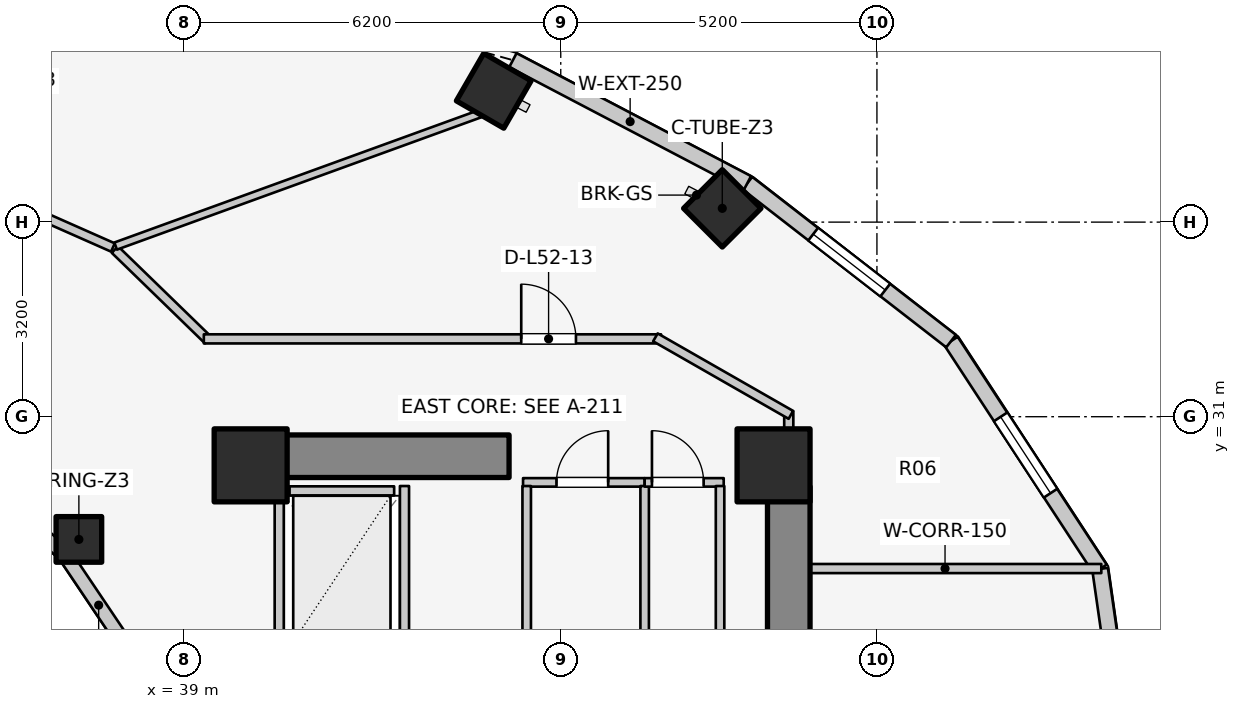
"""IFC4 building model, lengths in metres.
Left out: names, types, materials, properties, quantities, classifications, styles, units other than length and angle.
Written with IfcOpenShell. Run it as: python <this file> out.ifc"""

import sys

from ifc_helpers import new_model, si_unit, direction, frame, frame_2d, origin, origin_2d, place, context, subcontext, project, spatial, rectangle, extrude, element, fill, save


model = new_model("IFC4")
c1 = context("Model", 3, precision=1e-05, world=origin(), true_north=direction((0.0, 1.0)))
c2 = subcontext(c1, "Body", "Model", "MODEL_VIEW")
j1 = project(units=[si_unit("LENGTHUNIT", "METRE"), si_unit("PLANEANGLEUNIT", "RADIAN")], contexts=[c1])
p1 = place(None, origin())
s1 = spatial("IfcSite", under=j1, at=p1, CompositionType="ELEMENT")
p2 = place(p1, origin())
s2 = spatial("IfcBuilding", under=s1, at=p2, CompositionType="ELEMENT")
p3 = place(p2, frame((0.0, 0.0, 171.5)))
s3 = spatial("IfcBuildingStorey", under=s2, at=p3, CompositionType="ELEMENT", Elevation=171.5)
p4 = place(p3, frame((48.95, 17.05, 0.0), z_axis=(0.0, 0.0, 1.0), x_axis=(0.0, 1.0, 0.0)))
e1 = element("IfcWall", 1, at=p4, inside=s3, PredefinedType="SHEAR", context=c2, shape_type="SweptSolid", body=[
    extrude(rectangle(XDim=12.8, YDim=0.7, at=frame_2d((6.4, 0.0))), origin(), (0.0, 0.0, 1.0), 3.1),
])
p5 = place(p3, frame((39.85, 30.35, 0.0), z_axis=(0.0, 0.0, 1.0), x_axis=(1.0, 0.0, 0.0)))
e2 = element("IfcWall", 2, at=p5, inside=s3, PredefinedType="SHEAR", context=c2, shape_type="SweptSolid", body=[
    extrude(rectangle(XDim=4.5, YDim=0.7, at=frame_2d((2.25, 0.0))), origin(), (0.0, 0.0, 1.0), 3.1),
])
for number, where, z_axis, x_axis in (
    (3, (48.7, 30.2, 0.0), (0.0, 0.0, 1.0), (1.0, 0.0, 0.0)),
    (4, (40.1, 30.2, 0.0), (0.0, 0.0, 1.0), (1.0, 0.0, 0.0)),
):
    element("IfcColumn", number, at=place(p3, frame(where, z_axis=z_axis, x_axis=x_axis)), inside=s3, PredefinedType="COLUMN", context=c2, shape_type="SweptSolid", body=[
        extrude(rectangle(XDim=1.2, YDim=1.2, at=origin_2d()), origin(), (0.0, 0.0, 1.0), 3.1),
    ])
p6 = place(p3, frame((37.275, 28.982, 0.0), z_axis=(0.0, 0.0, 1.0), x_axis=(1.0, 0.0, 0.0)))
e5 = element("IfcColumn", 5, at=p6, inside=s3, PredefinedType="COLUMN", context=c2, shape_type="SweptSolid", body=[
    extrude(rectangle(XDim=0.75, YDim=0.75, at=origin_2d()), origin(), (0.0, 0.0, 1.0), 3.1),
])
for number, where, z_axis, x_axis in (
    (6, (47.857, 34.427, 0.0), (0.0, 0.0, 1.0), (0.707, 0.707, 0.0)),
    (7, (44.098, 36.359, 0.0), (0.0, 0.0, 1.0), (0.5, 0.866, 0.0)),
):
    element("IfcColumn", number, at=place(p3, frame(where, z_axis=z_axis, x_axis=x_axis)), inside=s3, PredefinedType="COLUMN", context=c2, shape_type="SweptSolid", body=[
        extrude(rectangle(XDim=0.9, YDim=0.9, at=origin_2d()), origin(), (0.0, 0.0, 1.0), 3.1),
    ])
p7 = place(p3, frame((38.166, 27.06, 0.0), z_axis=(0.0, 0.0, 1.0), x_axis=(-0.558197800898, 0.829707909492, 0.0)))
e8 = element("IfcWall", 8, at=p7, inside=s3, PredefinedType="STANDARD", context=c2, shape_type="SweptSolid", body=[
    extrude(rectangle(XDim=2.027, YDim=0.23, at=frame_2d((1.013, 0.0))), origin(), (0.0, 0.0, 1.0), 2.16),
])
p8 = place(p3, frame((37.035, 28.742, 0.0), z_axis=(0.0, 0.0, 1.0), x_axis=(-0.752576694707, 0.658504607869, 0.0)))
e9 = element("IfcWall", 9, at=p8, inside=s3, PredefinedType="STANDARD", context=c2, shape_type="SweptSolid", body=[
    extrude(rectangle(XDim=1.959, YDim=0.23, at=frame_2d((0.98, 0.0))), origin(), (0.0, 0.0, 1.0), 2.16),
])
p9 = place(p3, frame((54.86, 23.0, 0.0), z_axis=(0.0, 0.0, 1.0), x_axis=(-0.142227632286, 0.989833976288, 0.0)))
e10 = element("IfcWall", 10, at=p9, inside=s3, PredefinedType="STANDARD", context=c2, shape_type="SweptSolid", body=[
    extrude(rectangle(XDim=5.553, YDim=0.26, at=frame_2d((2.776, 0.0))), origin(), (0.0, 0.0, 1.0), 2.85),
])
p10 = place(p9, frame((2.027, 0.0, 0.75)))
e11 = element("IfcOpeningElement", 11, at=p10, cuts=e10, PredefinedType="OPENING", context=c2, shape_type="SweptSolid", body=[
    extrude(rectangle(XDim=1.5, YDim=1.6, at=frame_2d((0.75, 0.8))), frame((0.0, 0.14, 0.0), z_axis=(0.0, -1.0, 0.0), x_axis=(1.0, 0.0, 0.0)), (0.0, 0.0, 1.0), 0.28),
])
p11 = place(p3, frame((54.07, 28.497, 0.0), z_axis=(0.0, 0.0, 1.0), x_axis=(-0.547456494366, 0.836834145322, 0.0)))
e12 = element("IfcWall", 12, at=p11, inside=s3, PredefinedType="STANDARD", context=c2, shape_type="SweptSolid", body=[
    extrude(rectangle(XDim=4.477, YDim=0.26, at=frame_2d((2.239, 0.0))), origin(), (0.0, 0.0, 1.0), 2.85),
])
p12 = place(p11, frame((1.489, 0.0, 0.75)))
e13 = element("IfcOpeningElement", 13, at=p12, cuts=e12, PredefinedType="OPENING", context=c2, shape_type="SweptSolid", body=[
    extrude(rectangle(XDim=1.5, YDim=1.6, at=frame_2d((0.75, 0.8))), frame((0.0, 0.14, 0.0), z_axis=(0.0, -1.0, 0.0), x_axis=(1.0, 0.0, 0.0)), (0.0, 0.0, 1.0), 0.28),
])
p13 = place(p3, frame((51.619, 32.243, 0.0), z_axis=(0.0, 0.0, 1.0), x_axis=(-0.790185650662, 0.612867552973, 0.0)))
e14 = element("IfcWall", 14, at=p13, inside=s3, PredefinedType="STANDARD", context=c2, shape_type="SweptSolid", body=[
    extrude(rectangle(XDim=4.239, YDim=0.26, at=frame_2d((2.12, 0.0))), origin(), (0.0, 0.0, 1.0), 2.85),
])
p14 = place(p13, frame((1.37, 0.0, 0.75)))
e15 = element("IfcOpeningElement", 15, at=p14, cuts=e14, PredefinedType="OPENING", context=c2, shape_type="SweptSolid", body=[
    extrude(rectangle(XDim=1.5, YDim=1.6, at=frame_2d((0.75, 0.8))), frame((0.0, 0.14, 0.0), z_axis=(0.0, -1.0, 0.0), x_axis=(1.0, 0.0, 0.0)), (0.0, 0.0, 1.0), 0.28),
])
p15 = place(p3, frame((48.269, 34.842, 0.0), z_axis=(0.0, 0.0, 1.0), x_axis=(-0.885660265226, 0.464333818065, 0.0)))
e16 = element("IfcWall", 16, at=p15, inside=s3, PredefinedType="STANDARD", context=c2, shape_type="SweptSolid", body=[
    extrude(rectangle(XDim=4.354, YDim=0.26, at=frame_2d((2.177, 0.0))), origin(), (0.0, 0.0, 1.0), 2.85),
])
p16 = place(p3, frame((40.74, 29.78, 0.0), z_axis=(0.0, 0.0, 1.0), x_axis=(1.0, 0.0, 0.0)))
e17 = element("IfcWall", 17, at=p16, inside=s3, PredefinedType="SOLIDWALL", context=c2, shape_type="SweptSolid", body=[
    extrude(rectangle(XDim=1.72, YDim=0.15, at=frame_2d((0.86, 0.0))), origin(), (0.0, 0.0, 1.0), 2.855),
])
for number, where, z_axis, x_axis in (
    (18, (40.57, 27.14, 0.0), (0.0, 0.0, 1.0), (0.0, 1.0, 0.0)),
    (19, (42.63, 27.14, 0.0), (0.0, 0.0, 1.0), (0.0, 1.0, 0.0)),
):
    element("IfcWall", number, at=place(p3, frame(where, z_axis=z_axis, x_axis=x_axis)), inside=s3, PredefinedType="SOLIDWALL", context=c2, shape_type="SweptSolid", body=[
        extrude(rectangle(XDim=2.72, YDim=0.15, at=frame_2d((1.36, 0.0))), origin(), (0.0, 0.0, 1.0), 2.855),
    ])
p17 = place(p3, frame((44.58, 29.92, 0.0), z_axis=(0.0, 0.0, 1.0), x_axis=(1.0, 0.0, 0.0)))
e20 = element("IfcWall", 20, at=p17, inside=s3, PredefinedType="PLUMBINGWALL", context=c2, shape_type="SweptSolid", body=[
    extrude(rectangle(XDim=2.0, YDim=0.14, at=frame_2d((1.0, 0.0))), origin(), (0.0, 0.0, 1.0), 2.855),
])
p18 = place(p17, frame((0.55, 0.0, 0.0)))
e21 = element("IfcOpeningElement", 21, at=p18, cuts=e20, PredefinedType="OPENING", context=c2, shape_type="SweptSolid", body=[
    extrude(rectangle(XDim=0.85, YDim=2.05, at=frame_2d((0.425, 1.025))), frame((0.0, 0.08, 0.0), z_axis=(0.0, -1.0, 0.0), x_axis=(1.0, 0.0, 0.0)), (0.0, 0.0, 1.0), 0.16),
])
for number, where, z_axis, x_axis in (
    (22, (44.64, 25.98, 0.0), (0.0, 0.0, 1.0), (0.0, 1.0, 0.0)),
    (23, (46.58, 25.98, 0.0), (0.0, 0.0, 1.0), (0.0, 1.0, 0.0)),
):
    element("IfcWall", number, at=place(p3, frame(where, z_axis=z_axis, x_axis=x_axis)), inside=s3, PredefinedType="PLUMBINGWALL", context=c2, shape_type="SweptSolid", body=[
        extrude(rectangle(XDim=3.88, YDim=0.14, at=frame_2d((1.94, 0.0))), origin(), (0.0, 0.0, 1.0), 2.855),
    ])
p19 = place(p3, frame((46.58, 29.92, 0.0), z_axis=(0.0, 0.0, 1.0), x_axis=(1.0, 0.0, 0.0)))
e24 = element("IfcWall", 24, at=p19, inside=s3, PredefinedType="PLUMBINGWALL", context=c2, shape_type="SweptSolid", body=[
    extrude(rectangle(XDim=1.3, YDim=0.14, at=frame_2d((0.65, 0.0))), origin(), (0.0, 0.0, 1.0), 2.855),
])
p20 = place(p19, frame((0.12, 0.0, 0.0)))
e25 = element("IfcOpeningElement", 25, at=p20, cuts=e24, PredefinedType="OPENING", context=c2, shape_type="SweptSolid", body=[
    extrude(rectangle(XDim=0.85, YDim=2.05, at=frame_2d((0.425, 1.025))), frame((0.0, 0.08, 0.0), z_axis=(0.0, -1.0, 0.0), x_axis=(1.0, 0.0, 0.0)), (0.0, 0.0, 1.0), 0.16),
])
p21 = place(p3, frame((47.82, 25.98, 0.0), z_axis=(0.0, 0.0, 1.0), x_axis=(0.0, 1.0, 0.0)))
e26 = element("IfcWall", 26, at=p21, inside=s3, PredefinedType="PLUMBINGWALL", context=c2, shape_type="SweptSolid", body=[
    extrude(rectangle(XDim=3.88, YDim=0.14, at=frame_2d((1.94, 0.0))), origin(), (0.0, 0.0, 1.0), 2.855),
])
p22 = place(p3, frame((48.95, 28.503, 0.0), z_axis=(0.0, 0.0, 1.0), x_axis=(1.0, 0.0, 0.0)))
e27 = element("IfcWall", 27, at=p22, inside=s3, PredefinedType="PARTITIONING", context=c2, shape_type="SweptSolid", body=[
    extrude(rectangle(XDim=5.14, YDim=0.15, at=frame_2d((2.57, 0.0))), origin(), (0.0, 0.0, 1.0), 2.855),
])
p23 = place(p3, frame((48.95, 29.8, 0.0), z_axis=(0.0, 0.0, 1.0), x_axis=(0.0, 1.0, 0.0)))
e28 = element("IfcWall", 28, at=p23, inside=s3, PredefinedType="PARTITIONING", context=c2, shape_type="SweptSolid", body=[
    extrude(rectangle(XDim=1.29, YDim=0.15, at=frame_2d((0.645, 0.0))), origin(), (0.0, 0.0, 1.0), 2.855),
])
p24 = place(p3, frame((37.867, 33.749, 0.0), z_axis=(0.0, 0.0, 1.0), x_axis=(0.717419568599, -0.696641344302, 0.0)))
e29 = element("IfcWall", 29, at=p24, inside=s3, PredefinedType="PARTITIONING", context=c2, shape_type="SweptSolid", body=[
    extrude(rectangle(XDim=2.138, YDim=0.15, at=frame_2d((1.069, 0.0))), origin(), (0.0, 0.0, 1.0), 2.299),
])
p25 = place(p3, frame((39.33, 32.28, 0.0), z_axis=(0.0, 0.0, 1.0), x_axis=(1.0, 0.0, 0.0)))
e30 = element("IfcWall", 30, at=p25, inside=s3, PredefinedType="PARTITIONING", context=c2, shape_type="SweptSolid", body=[
    extrude(rectangle(XDim=7.52, YDim=0.15, at=frame_2d((3.76, 0.0))), origin(), (0.0, 0.0, 1.0), 2.299),
])
p26 = place(p25, frame((5.22, 0.0, 0.0)))
e31 = element("IfcOpeningElement", 31, at=p26, cuts=e30, PredefinedType="OPENING", context=c2, shape_type="SweptSolid", body=[
    extrude(rectangle(XDim=0.9, YDim=2.1, at=frame_2d((0.45, 1.05))), frame((0.0, 0.085, 0.0), z_axis=(0.0, -1.0, 0.0), x_axis=(1.0, 0.0, 0.0)), (0.0, 0.0, 1.0), 0.17),
])
p27 = place(p3, frame((46.757, 32.305, 0.0), z_axis=(0.0, 0.0, 1.0), x_axis=(0.867991349648, -0.496579315857, 0.0)))
e32 = element("IfcWall", 32, at=p27, inside=s3, PredefinedType="PARTITIONING", context=c2, shape_type="SweptSolid", body=[
    extrude(rectangle(XDim=2.567, YDim=0.15, at=frame_2d((1.283, 0.0))), origin(), (0.0, 0.0, 1.0), 2.22),
])
p28 = place(p3, frame((37.88, 33.806, 0.0), z_axis=(0.0, 0.0, 1.0), x_axis=(0.939901628116, 0.341445353557, 0.0)))
e33 = element("IfcWall", 33, at=p28, inside=s3, PredefinedType="PARTITIONING", context=c2, shape_type="SweptSolid", body=[
    extrude(rectangle(XDim=6.387, YDim=0.125, at=frame_2d((3.194, 0.0))), origin(), (0.0, 0.0, 1.0), 2.299),
])
p29 = place(p3, frame((37.835, 33.783, 0.0), z_axis=(0.0, 0.0, 1.0), x_axis=(-0.91445214467, 0.404694051239, 0.0)))
e34 = element("IfcWall", 34, at=p29, inside=s3, PredefinedType="PARTITIONING", context=c2, shape_type="SweptSolid", body=[
    extrude(rectangle(XDim=3.091, YDim=0.15, at=frame_2d((1.545, 0.0))), origin(), (0.0, 0.0, 1.0), 2.299),
])
p30 = place(p12, origin())
e35 = element("IfcWindow", 35, at=p30, inside=s3, PartitioningType="SINGLE_PANEL", PredefinedType="WINDOW", context=c2, shape_type="SweptSolid", body=[
    extrude(rectangle(XDim=1.5, YDim=1.6, at=frame_2d((0.75, 0.8))), frame((0.0, 0.03, 0.0), z_axis=(0.0, -1.0, 0.0), x_axis=(1.0, 0.0, 0.0)), (0.0, 0.0, 1.0), 0.06),
])
fill(e13, e35)
p31 = place(p14, origin())
e36 = element("IfcWindow", 36, at=p31, inside=s3, PartitioningType="SINGLE_PANEL", PredefinedType="WINDOW", context=c2, shape_type="SweptSolid", body=[
    extrude(rectangle(XDim=1.5, YDim=1.6, at=frame_2d((0.75, 0.8))), frame((0.0, 0.03, 0.0), z_axis=(0.0, -1.0, 0.0), x_axis=(1.0, 0.0, 0.0)), (0.0, 0.0, 1.0), 0.06),
])
fill(e15, e36)
p32 = place(p18, origin())
e37 = element("IfcDoor", 37, at=p32, inside=s3, OperationType="SINGLE_SWING_RIGHT", PredefinedType="DOOR", context=c2, shape_type="SweptSolid", body=[
    extrude(rectangle(XDim=0.85, YDim=2.05, at=frame_2d((0.425, 1.025))), frame((0.0, 0.025, 0.0), z_axis=(0.0, -1.0, 0.0), x_axis=(1.0, 0.0, 0.0)), (0.0, 0.0, 1.0), 0.05),
])
fill(e21, e37)
p33 = place(p20, origin())
e38 = element("IfcDoor", 38, at=p33, inside=s3, OperationType="SINGLE_SWING_LEFT", PredefinedType="DOOR", context=c2, shape_type="SweptSolid", body=[
    extrude(rectangle(XDim=0.85, YDim=2.05, at=frame_2d((0.425, 1.025))), frame((0.0, 0.025, 0.0), z_axis=(0.0, -1.0, 0.0), x_axis=(1.0, 0.0, 0.0)), (0.0, 0.0, 1.0), 0.05),
])
fill(e25, e38)
p34 = place(p26, origin())
e39 = element("IfcDoor", 39, at=p34, inside=s3, OperationType="SINGLE_SWING_LEFT", PredefinedType="DOOR", context=c2, shape_type="SweptSolid", body=[
    extrude(rectangle(XDim=0.9, YDim=2.1, at=frame_2d((0.45, 1.05))), frame((0.0, 0.025, 0.0), z_axis=(0.0, -1.0, 0.0), x_axis=(1.0, 0.0, 0.0)), (0.0, 0.0, 1.0), 0.05),
])
fill(e31, e39)
save(model, sys.argv[1])
